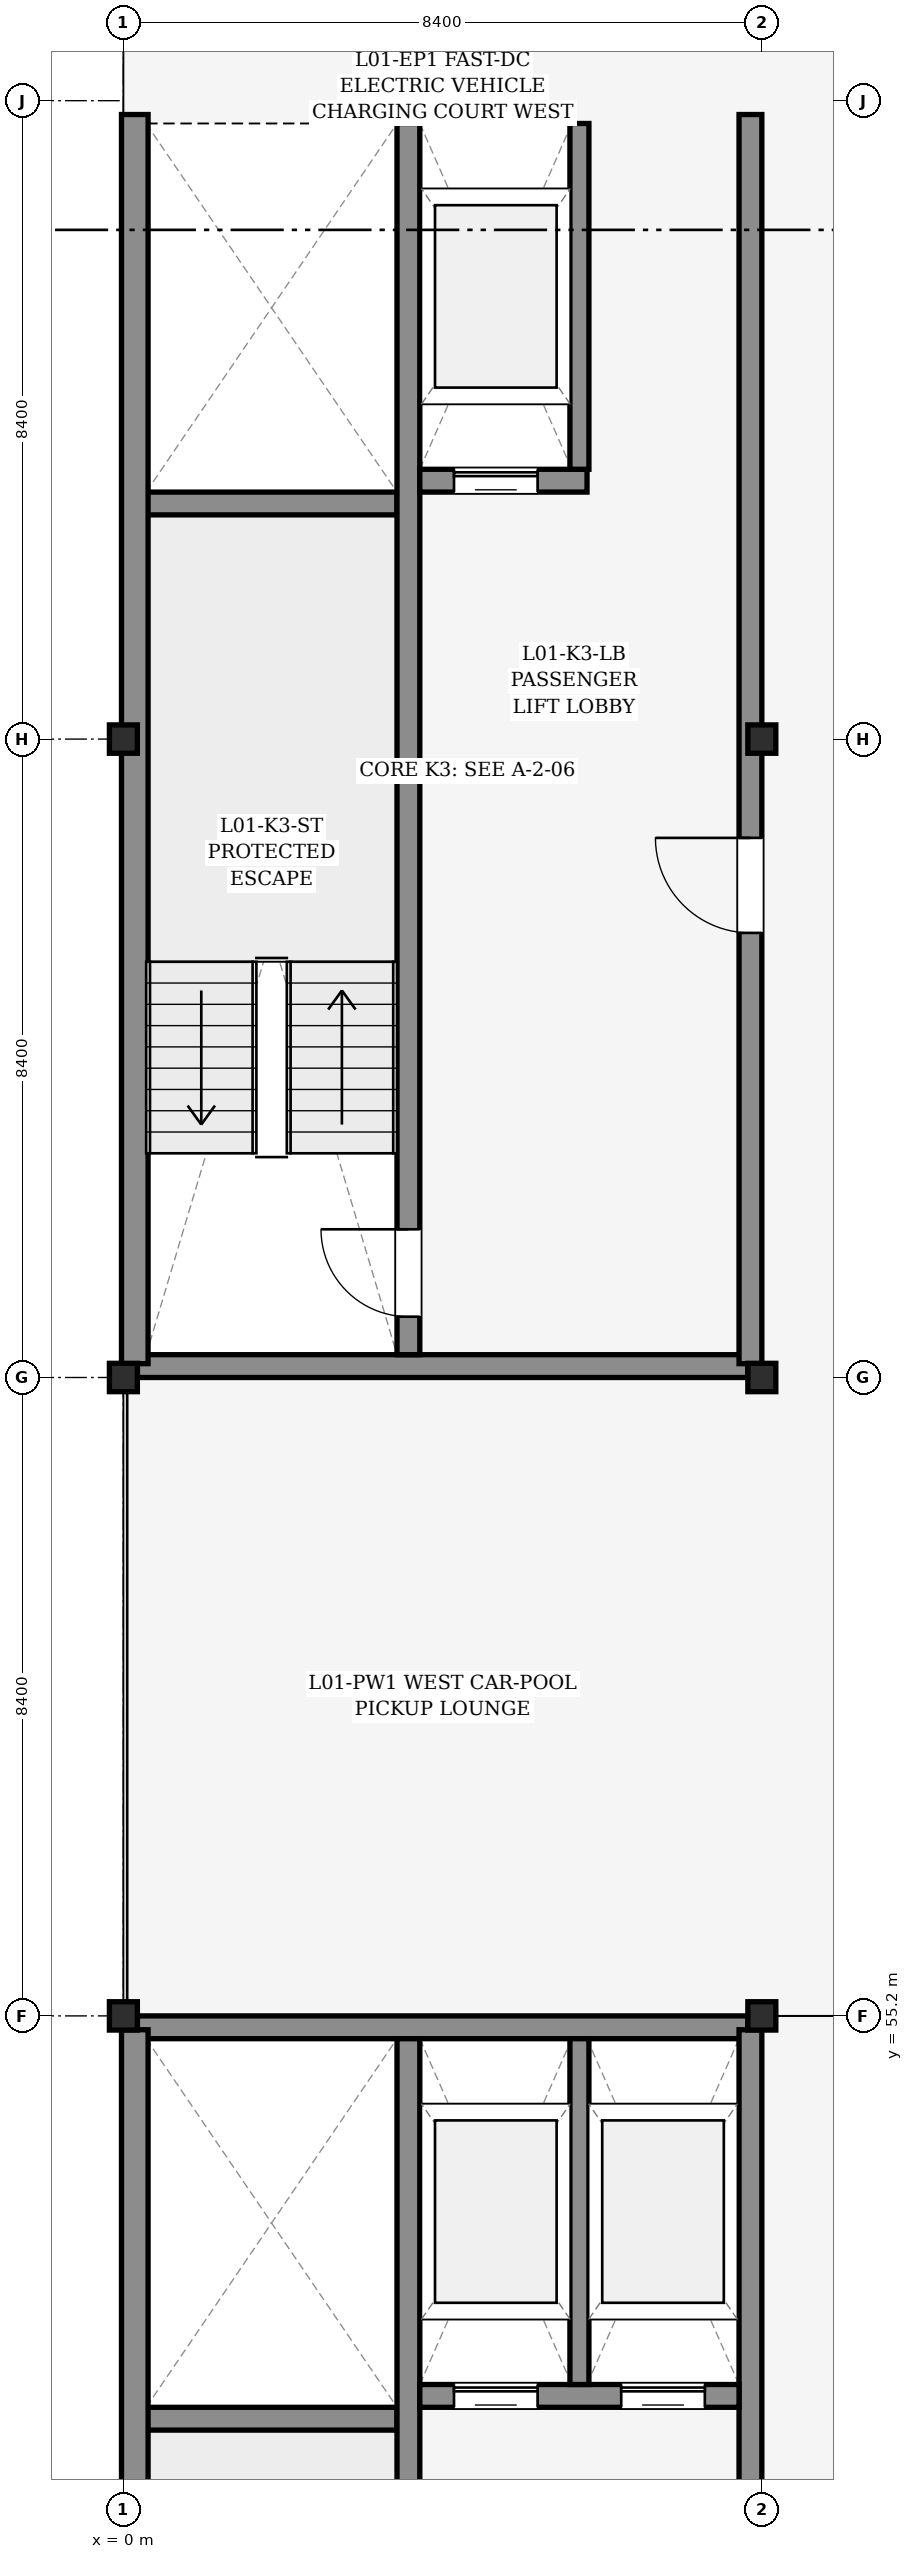
"""IFC4 building model, lengths in metres.
Left out: names, types, materials, properties, quantities, classifications, styles, units other than length and angle.
Written with IfcOpenShell. Run it as: python <this file> out.ifc"""

import sys

from ifc_helpers import new_model, si_unit, direction, frame, frame_2d, origin, origin_2d, place, context, subcontext, project, spatial, rectangle, i_section, extrude, element, fill, save


model = new_model("IFC4")
c1 = context("Model", 3, precision=1e-05, world=origin(), true_north=direction((0.0, 1.0)))
c2 = subcontext(c1, "Body", "Model", "MODEL_VIEW")
j1 = project(units=[si_unit("LENGTHUNIT", "METRE"), si_unit("PLANEANGLEUNIT", "RADIAN")], contexts=[c1])
p1 = place(None, origin())
s1 = spatial("IfcSite", under=j1, at=p1, CompositionType="ELEMENT")
p2 = place(p1, origin())
s2 = spatial("IfcBuilding", under=s1, at=p2, CompositionType="ELEMENT")
p3 = place(p2, frame((0.0, 0.0, 5.4)))
s3 = spatial("IfcBuildingStorey", under=s2, at=p3, CompositionType="ELEMENT", Elevation=5.4)
for number, where, z_axis, x_axis in (
    (1, (0.0, 55.2, 0.0), (0.0, 0.0, 1.0), (1.0, 0.0, 0.0)),
    (2, (0.0, 63.6, 0.0), (0.0, 0.0, 1.0), (1.0, 0.0, 0.0)),
    (3, (0.0, 72.0, 0.0), (0.0, 0.0, 1.0), (1.0, 0.0, 0.0)),
    (4, (0.0, 80.4, 0.0), (0.0, 0.0, 1.0), (1.0, 0.0, 0.0)),
    (5, (8.4, 55.2, 0.0), (0.0, 0.0, 1.0), (1.0, 0.0, 0.0)),
    (6, (8.4, 63.6, 0.0), (0.0, 0.0, 1.0), (1.0, 0.0, 0.0)),
    (7, (8.4, 72.0, 0.0), (0.0, 0.0, 1.0), (1.0, 0.0, 0.0)),
    (8, (8.4, 80.4, 0.0), (0.0, 0.0, 1.0), (1.0, 0.0, 0.0)),
):
    element("IfcColumn", number, at=place(p3, frame(where, z_axis=z_axis, x_axis=x_axis)), inside=s3, PredefinedType="COLUMN", context=c2, shape_type="SweptSolid", body=[
        extrude(i_section(OverallWidth=0.373, OverallDepth=0.368, WebThickness=0.014, FlangeThickness=0.024, FilletRadius=0.015, at=origin_2d()), origin(), (0.0, 0.0, 1.0), 3.6),
    ])
p4 = place(p3, frame((0.185, 55.05, 0.0), z_axis=(0.0, 0.0, 1.0), x_axis=(1.0, 0.0, 0.0)))
e9 = element("IfcWall", 9, at=p4, inside=s3, PredefinedType="SHEAR", context=c2, shape_type="SweptSolid", body=[
    extrude(rectangle(XDim=8.031, YDim=0.3, at=frame_2d((4.016, 0.0))), origin(), (0.0, 0.0, 1.0), 3.38),
])
p5 = place(p3, frame((0.3, 49.9, 0.0), z_axis=(0.0, 0.0, 1.0), x_axis=(1.0, 0.0, 0.0)))
e10 = element("IfcWall", 10, at=p5, inside=s3, PredefinedType="SHEAR", context=c2, shape_type="SweptSolid", body=[
    extrude(rectangle(XDim=3.3, YDim=0.3, at=frame_2d((1.65, 0.0))), origin(), (0.0, 0.0, 1.0), 3.38),
])
p6 = place(p3, frame((0.15, 38.582, 0.0), z_axis=(0.0, 0.0, 1.0), x_axis=(0.0, 1.0, 0.0)))
e11 = element("IfcWall", 11, at=p6, inside=s3, PredefinedType="SHEAR", context=c2, shape_type="SweptSolid", body=[
    extrude(rectangle(XDim=16.436, YDim=0.35, at=frame_2d((8.218, 0.0))), origin(), (0.0, 0.0, 1.0), 3.38),
])
p7 = place(p3, frame((8.25, 38.582, 0.0), z_axis=(0.0, 0.0, 1.0), x_axis=(0.0, 1.0, 0.0)))
e12 = element("IfcWall", 12, at=p7, inside=s3, PredefinedType="SHEAR", context=c2, shape_type="SweptSolid", body=[
    extrude(rectangle(XDim=16.436, YDim=0.3, at=frame_2d((8.218, 0.0))), origin(), (0.0, 0.0, 1.0), 3.38),
])
p8 = place(p7, frame((5.668, 0.0, 0.0)))
e13 = element("IfcOpeningElement", 13, at=p8, cuts=e12, PredefinedType="OPENING", context=c2, shape_type="SweptSolid", body=[
    extrude(rectangle(XDim=1.3, YDim=2.2, at=frame_2d((0.65, 1.1))), frame((0.0, 0.16, 0.0), z_axis=(0.0, -1.0, 0.0), x_axis=(1.0, 0.0, 0.0)), (0.0, 0.0, 1.0), 0.32),
])
p9 = place(p3, frame((3.75, 38.7, 0.0), z_axis=(0.0, 0.0, 1.0), x_axis=(0.0, 1.0, 0.0)))
e14 = element("IfcWall", 14, at=p9, inside=s3, PredefinedType="SHEAR", context=c2, shape_type="SweptSolid", body=[
    extrude(rectangle(XDim=16.2, YDim=0.3, at=frame_2d((8.1, 0.0))), origin(), (0.0, 0.0, 1.0), 3.38),
])
p10 = place(p9, frame((0.5, 0.0, 0.0)))
e15 = element("IfcOpeningElement", 15, at=p10, cuts=e14, PredefinedType="OPENING", context=c2, shape_type="SweptSolid", body=[
    extrude(rectangle(XDim=1.15, YDim=2.15, at=frame_2d((0.575, 1.075))), frame((0.0, 0.16, 0.0), z_axis=(0.0, -1.0, 0.0), x_axis=(1.0, 0.0, 0.0)), (0.0, 0.0, 1.0), 0.32),
])
p11 = place(p3, frame((3.9, 50.2, 0.0), z_axis=(0.0, 0.0, 1.0), x_axis=(1.0, 0.0, 0.0)))
e16 = element("IfcWall", 16, at=p11, inside=s3, PredefinedType="SHEAR", context=c2, shape_type="SweptSolid", body=[
    extrude(rectangle(XDim=4.2, YDim=0.3, at=frame_2d((2.1, 0.0))), origin(), (0.0, 0.0, 1.0), 3.38),
])
p12 = place(p11, frame((0.45, 0.0, 0.0)))
e17 = element("IfcOpeningElement", 17, at=p12, cuts=e16, PredefinedType="OPENING", context=c2, shape_type="SweptSolid", body=[
    extrude(rectangle(XDim=1.1, YDim=2.2, at=frame_2d((0.55, 1.1))), frame((0.0, 0.16, 0.0), z_axis=(0.0, -1.0, 0.0), x_axis=(1.0, 0.0, 0.0)), (0.0, 0.0, 1.0), 0.32),
])
p13 = place(p11, frame((2.65, 0.0, 0.0)))
e18 = element("IfcOpeningElement", 18, at=p13, cuts=e16, PredefinedType="OPENING", context=c2, shape_type="SweptSolid", body=[
    extrude(rectangle(XDim=1.1, YDim=2.2, at=frame_2d((0.55, 1.1))), frame((0.0, 0.16, 0.0), z_axis=(0.0, -1.0, 0.0), x_axis=(1.0, 0.0, 0.0)), (0.0, 0.0, 1.0), 0.32),
])
p14 = place(p3, frame((6.0, 50.35, 0.0), z_axis=(0.0, 0.0, 1.0), x_axis=(0.0, 1.0, 0.0)))
e19 = element("IfcWall", 19, at=p14, inside=s3, PredefinedType="PARTITIONING", context=c2, shape_type="SweptSolid", body=[
    extrude(rectangle(XDim=4.55, YDim=0.25, at=frame_2d((2.275, 0.0))), origin(), (0.0, 0.0, 1.0), 2.525),
])
for number, where, z_axis, x_axis in (
    (20, (0.185, 63.75, 0.0), (0.0, 0.0, 1.0), (1.0, 0.0, 0.0)),
    (21, (0.185, 80.25, 0.0), (0.0, 0.0, 1.0), (1.0, 0.0, 0.0)),
):
    element("IfcWall", number, at=place(p3, frame(where, z_axis=z_axis, x_axis=x_axis)), inside=s3, PredefinedType="SHEAR", context=c2, shape_type="SweptSolid", body=[
        extrude(rectangle(XDim=8.031, YDim=0.3, at=frame_2d((4.016, 0.0))), origin(), (0.0, 0.0, 1.0), 3.38),
    ])
p15 = place(p3, frame((0.3, 75.1, 0.0), z_axis=(0.0, 0.0, 1.0), x_axis=(1.0, 0.0, 0.0)))
e22 = element("IfcWall", 22, at=p15, inside=s3, PredefinedType="SHEAR", context=c2, shape_type="SweptSolid", body=[
    extrude(rectangle(XDim=3.3, YDim=0.3, at=frame_2d((1.65, 0.0))), origin(), (0.0, 0.0, 1.0), 3.38),
])
p16 = place(p3, frame((0.15, 63.782, 0.0), z_axis=(0.0, 0.0, 1.0), x_axis=(0.0, 1.0, 0.0)))
e23 = element("IfcWall", 23, at=p16, inside=s3, PredefinedType="SHEAR", context=c2, shape_type="SweptSolid", body=[
    extrude(rectangle(XDim=16.436, YDim=0.35, at=frame_2d((8.218, 0.0))), origin(), (0.0, 0.0, 1.0), 3.38),
])
p17 = place(p3, frame((8.25, 63.782, 0.0), z_axis=(0.0, 0.0, 1.0), x_axis=(0.0, 1.0, 0.0)))
e24 = element("IfcWall", 24, at=p17, inside=s3, PredefinedType="SHEAR", context=c2, shape_type="SweptSolid", body=[
    extrude(rectangle(XDim=16.436, YDim=0.3, at=frame_2d((8.218, 0.0))), origin(), (0.0, 0.0, 1.0), 3.38),
])
p18 = place(p17, frame((5.668, 0.0, 0.0)))
e25 = element("IfcOpeningElement", 25, at=p18, cuts=e24, PredefinedType="OPENING", context=c2, shape_type="SweptSolid", body=[
    extrude(rectangle(XDim=1.25, YDim=2.15, at=frame_2d((0.625, 1.075))), frame((0.0, 0.16, 0.0), z_axis=(0.0, -1.0, 0.0), x_axis=(1.0, 0.0, 0.0)), (0.0, 0.0, 1.0), 0.32),
])
p19 = place(p3, frame((3.75, 63.9, 0.0), z_axis=(0.0, 0.0, 1.0), x_axis=(0.0, 1.0, 0.0)))
e26 = element("IfcWall", 26, at=p19, inside=s3, PredefinedType="SHEAR", context=c2, shape_type="SweptSolid", body=[
    extrude(rectangle(XDim=16.2, YDim=0.3, at=frame_2d((8.1, 0.0))), origin(), (0.0, 0.0, 1.0), 3.38),
])
p20 = place(p19, frame((0.5, 0.0, 0.0)))
e27 = element("IfcOpeningElement", 27, at=p20, cuts=e26, PredefinedType="OPENING", context=c2, shape_type="SweptSolid", body=[
    extrude(rectangle(XDim=1.15, YDim=2.15, at=frame_2d((0.575, 1.075))), frame((0.0, 0.16, 0.0), z_axis=(0.0, -1.0, 0.0), x_axis=(1.0, 0.0, 0.0)), (0.0, 0.0, 1.0), 0.32),
])
p21 = place(p3, frame((3.9, 75.4, 0.0), z_axis=(0.0, 0.0, 1.0), x_axis=(1.0, 0.0, 0.0)))
e28 = element("IfcWall", 28, at=p21, inside=s3, PredefinedType="SHEAR", context=c2, shape_type="SweptSolid", body=[
    extrude(rectangle(XDim=2.2, YDim=0.3, at=frame_2d((1.1, 0.0))), origin(), (0.0, 0.0, 1.0), 3.38),
])
p22 = place(p21, frame((0.45, 0.0, 0.0)))
e29 = element("IfcOpeningElement", 29, at=p22, cuts=e28, PredefinedType="OPENING", context=c2, shape_type="SweptSolid", body=[
    extrude(rectangle(XDim=1.1, YDim=2.2, at=frame_2d((0.55, 1.1))), frame((0.0, 0.16, 0.0), z_axis=(0.0, -1.0, 0.0), x_axis=(1.0, 0.0, 0.0)), (0.0, 0.0, 1.0), 0.32),
])
p23 = place(p3, frame((6.0, 75.55, 0.0), z_axis=(0.0, 0.0, 1.0), x_axis=(0.0, 1.0, 0.0)))
e30 = element("IfcWall", 30, at=p23, inside=s3, PredefinedType="PARTITIONING", context=c2, shape_type="SweptSolid", body=[
    extrude(rectangle(XDim=4.55, YDim=0.25, at=frame_2d((2.275, 0.0))), origin(), (0.0, 0.0, 1.0), 2.525),
])
p24 = place(p12, origin())
e31 = element("IfcDoor", 31, at=p24, inside=s3, OperationType="SLIDING_TO_LEFT", PredefinedType="DOOR", context=c2, shape_type="SweptSolid", body=[
    extrude(rectangle(XDim=1.1, YDim=2.2, at=frame_2d((0.55, 1.1))), frame((0.0, 0.025, 0.0), z_axis=(0.0, -1.0, 0.0), x_axis=(1.0, 0.0, 0.0)), (0.0, 0.0, 1.0), 0.05),
])
fill(e17, e31)
p25 = place(p13, origin())
e32 = element("IfcDoor", 32, at=p25, inside=s3, OperationType="SLIDING_TO_LEFT", PredefinedType="DOOR", context=c2, shape_type="SweptSolid", body=[
    extrude(rectangle(XDim=1.1, YDim=2.2, at=frame_2d((0.55, 1.1))), frame((0.0, 0.025, 0.0), z_axis=(0.0, -1.0, 0.0), x_axis=(1.0, 0.0, 0.0)), (0.0, 0.0, 1.0), 0.05),
])
fill(e18, e32)
p26 = place(p18, origin())
e33 = element("IfcDoor", 33, at=p26, inside=s3, OperationType="SINGLE_SWING_RIGHT", PredefinedType="DOOR", context=c2, shape_type="SweptSolid", body=[
    extrude(rectangle(XDim=1.25, YDim=2.15, at=frame_2d((0.625, 1.075))), frame((0.0, 0.025, 0.0), z_axis=(0.0, -1.0, 0.0), x_axis=(1.0, 0.0, 0.0)), (0.0, 0.0, 1.0), 0.05),
])
fill(e25, e33)
p27 = place(p20, frame((1.15, 0.0, 0.0), z_axis=(0.0, 0.0, 1.0), x_axis=(-1.0, 0.0, 0.0)))
e34 = element("IfcDoor", 34, at=p27, inside=s3, OperationType="SINGLE_SWING_LEFT", PredefinedType="DOOR", context=c2, shape_type="SweptSolid", body=[
    extrude(rectangle(XDim=1.15, YDim=2.15, at=frame_2d((0.575, 1.075))), frame((0.0, 0.025, 0.0), z_axis=(0.0, -1.0, 0.0), x_axis=(1.0, 0.0, 0.0)), (0.0, 0.0, 1.0), 0.05),
])
fill(e27, e34)
p28 = place(p22, origin())
e35 = element("IfcDoor", 35, at=p28, inside=s3, OperationType="SLIDING_TO_LEFT", PredefinedType="DOOR", context=c2, shape_type="SweptSolid", body=[
    extrude(rectangle(XDim=1.1, YDim=2.2, at=frame_2d((0.55, 1.1))), frame((0.0, 0.025, 0.0), z_axis=(0.0, -1.0, 0.0), x_axis=(1.0, 0.0, 0.0)), (0.0, 0.0, 1.0), 0.05),
])
fill(e29, e35)
save(model, sys.argv[1])
